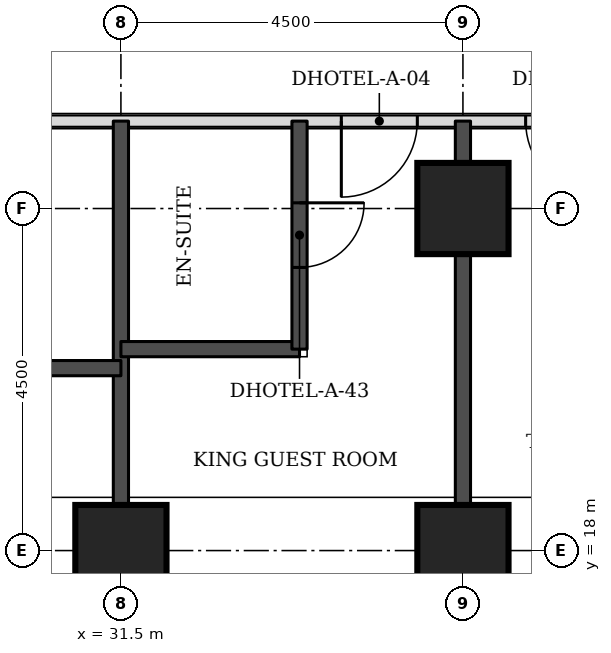
"""IFC4 building model, lengths in metres.
Left out: names, types, materials, properties, quantities, classifications, styles, units other than length and angle.
Written with IfcOpenShell. Run it as: python <this file> out.ifc"""

import sys

from ifc_helpers import new_model, si_unit, direction, frame, frame_2d, origin, origin_2d, place, context, subcontext, project, spatial, rectangle, extrude, element, fill, save


model = new_model("IFC4")
c1 = context("Model", 3, precision=1e-05, world=origin(), true_north=direction((0.0, 1.0)))
c2 = subcontext(c1, "Body", "Model", "MODEL_VIEW")
j1 = project(units=[si_unit("LENGTHUNIT", "METRE"), si_unit("PLANEANGLEUNIT", "RADIAN")], contexts=[c1])
p1 = place(None, origin())
s1 = spatial("IfcSite", under=j1, at=p1, CompositionType="ELEMENT")
p2 = place(p1, origin())
s2 = spatial("IfcBuilding", under=s1, at=p2, CompositionType="ELEMENT")
p3 = place(p2, frame((0.0, 0.0, 49.5)))
s3 = spatial("IfcBuildingStorey", under=s2, at=p3, CompositionType="ELEMENT", Elevation=49.5)
for number, where, z_axis, x_axis in (
    (1, (31.5, 18.0, 0.0), (0.0, 0.0, 1.0), (1.0, 0.0, 0.0)),
    (2, (36.0, 18.0, 0.0), (0.0, 0.0, 1.0), (1.0, 0.0, 0.0)),
    (3, (36.0, 22.5, 0.0), (0.0, 0.0, 1.0), (1.0, 0.0, 0.0)),
):
    element("IfcColumn", number, at=place(p3, frame(where, z_axis=z_axis, x_axis=x_axis)), inside=s3, PredefinedType="COLUMN", context=c2, shape_type="SweptSolid", body=[
        extrude(rectangle(XDim=1.2, YDim=1.2, at=origin_2d()), origin(), (0.0, 0.0, 1.0), 3.3),
    ])
p4 = place(p3, frame((19.15, 23.65, 0.0), z_axis=(0.0, 0.0, 1.0), x_axis=(1.0, 0.0, 0.0)))
e4 = element("IfcWall", 4, at=p4, inside=s3, PredefinedType="PARTITIONING", context=c2, shape_type="SweptSolid", body=[
    extrude(rectangle(XDim=32.35, YDim=0.15, at=frame_2d((16.175, 0.0))), origin(), (0.0, 0.0, 1.0), 3.08),
])
p5 = place(p4, frame((6.275, 0.0, 0.0)))
e5 = element("IfcOpeningElement", 5, at=p5, cuts=e4, PredefinedType="OPENING", context=c2, shape_type="SweptSolid", body=[
    extrude(rectangle(XDim=1.0, YDim=2.1, at=frame_2d((0.5, 1.05))), frame((0.0, 0.085, 0.0), z_axis=(0.0, -1.0, 0.0), x_axis=(1.0, 0.0, 0.0)), (0.0, 0.0, 1.0), 0.17),
])
p6 = place(p4, frame((8.675, 0.0, 0.0)))
e6 = element("IfcOpeningElement", 6, at=p6, cuts=e4, PredefinedType="OPENING", context=c2, shape_type="SweptSolid", body=[
    extrude(rectangle(XDim=1.0, YDim=2.1, at=frame_2d((0.5, 1.05))), frame((0.0, 0.085, 0.0), z_axis=(0.0, -1.0, 0.0), x_axis=(1.0, 0.0, 0.0)), (0.0, 0.0, 1.0), 0.17),
])
p7 = place(p4, frame((15.25, 0.0, 0.0)))
e7 = element("IfcOpeningElement", 7, at=p7, cuts=e4, PredefinedType="OPENING", context=c2, shape_type="SweptSolid", body=[
    extrude(rectangle(XDim=1.0, YDim=2.1, at=frame_2d((0.5, 1.05))), frame((0.0, 0.085, 0.0), z_axis=(0.0, -1.0, 0.0), x_axis=(1.0, 0.0, 0.0)), (0.0, 0.0, 1.0), 0.17),
])
p8 = place(p4, frame((17.675, 0.0, 0.0)))
e8 = element("IfcOpeningElement", 8, at=p8, cuts=e4, PredefinedType="OPENING", context=c2, shape_type="SweptSolid", body=[
    extrude(rectangle(XDim=1.0, YDim=2.1, at=frame_2d((0.5, 1.05))), frame((0.0, 0.085, 0.0), z_axis=(0.0, -1.0, 0.0), x_axis=(1.0, 0.0, 0.0)), (0.0, 0.0, 1.0), 0.17),
])
p9 = place(p4, frame((24.275, 0.0, 0.0)))
e9 = element("IfcOpeningElement", 9, at=p9, cuts=e4, PredefinedType="OPENING", context=c2, shape_type="SweptSolid", body=[
    extrude(rectangle(XDim=1.0, YDim=2.1, at=frame_2d((0.5, 1.05))), frame((0.0, 0.085, 0.0), z_axis=(0.0, -1.0, 0.0), x_axis=(1.0, 0.0, 0.0)), (0.0, 0.0, 1.0), 0.17),
])
p10 = place(p4, frame((26.675, 0.0, 0.0)))
e10 = element("IfcOpeningElement", 10, at=p10, cuts=e4, PredefinedType="OPENING", context=c2, shape_type="SweptSolid", body=[
    extrude(rectangle(XDim=1.0, YDim=2.1, at=frame_2d((0.5, 1.05))), frame((0.0, 0.085, 0.0), z_axis=(0.0, -1.0, 0.0), x_axis=(1.0, 0.0, 0.0)), (0.0, 0.0, 1.0), 0.17),
])
p11 = place(p4, frame((1.175, 0.0, 0.0)))
e11 = element("IfcOpeningElement", 11, at=p11, cuts=e4, PredefinedType="OPENING", context=c2, shape_type="SweptSolid", body=[
    extrude(rectangle(XDim=1.0, YDim=2.1, at=frame_2d((0.5, 1.05))), frame((0.0, 0.085, 0.0), z_axis=(0.0, -1.0, 0.0), x_axis=(1.0, 0.0, 0.0)), (0.0, 0.0, 1.0), 0.17),
])
p12 = place(p4, frame((30.85, 0.0, 0.0)))
e12 = element("IfcOpeningElement", 12, at=p12, cuts=e4, PredefinedType="OPENING", context=c2, shape_type="SweptSolid", body=[
    extrude(rectangle(XDim=1.0, YDim=2.1, at=frame_2d((0.5, 1.05))), frame((0.0, 0.085, 0.0), z_axis=(0.0, -1.0, 0.0), x_axis=(1.0, 0.0, 0.0)), (0.0, 0.0, 1.0), 0.17),
])
for number, where, z_axis, x_axis in (
    (13, (31.5, 18.6, 0.0), (0.0, 0.0, 1.0), (0.0, 1.0, 0.0)),
    (14, (36.0, 18.6, 0.0), (0.0, 0.0, 1.0), (0.0, 1.0, 0.0)),
):
    element("IfcWall", number, at=place(p3, frame(where, z_axis=z_axis, x_axis=x_axis)), inside=s3, PredefinedType="SOLIDWALL", context=c2, shape_type="SweptSolid", body=[
        extrude(rectangle(XDim=5.05, YDim=0.2, at=frame_2d((2.525, 0.0))), origin(), (0.0, 0.0, 1.0), 3.08),
    ])
p13 = place(p3, frame((29.65, 20.4, 0.0), z_axis=(0.0, 0.0, 1.0), x_axis=(1.0, 0.0, 0.0)))
e15 = element("IfcWall", 15, at=p13, inside=s3, PredefinedType="SOLIDWALL", context=c2, shape_type="SweptSolid", body=[
    extrude(rectangle(XDim=1.85, YDim=0.2, at=frame_2d((0.925, 0.0))), origin(), (0.0, 0.0, 1.0), 3.08),
])
p14 = place(p3, frame((31.5, 20.65, 0.0), z_axis=(0.0, 0.0, 1.0), x_axis=(1.0, 0.0, 0.0)))
e16 = element("IfcWall", 16, at=p14, inside=s3, PredefinedType="SOLIDWALL", context=c2, shape_type="SweptSolid", body=[
    extrude(rectangle(XDim=2.35, YDim=0.2, at=frame_2d((1.175, 0.0))), origin(), (0.0, 0.0, 1.0), 3.08),
])
p15 = place(p3, frame((33.85, 20.65, 0.0), z_axis=(0.0, 0.0, 1.0), x_axis=(0.0, 1.0, 0.0)))
e17 = element("IfcWall", 17, at=p15, inside=s3, PredefinedType="SOLIDWALL", context=c2, shape_type="SweptSolid", body=[
    extrude(rectangle(XDim=3.0, YDim=0.2, at=frame_2d((1.5, 0.0))), origin(), (0.0, 0.0, 1.0), 3.08),
])
p16 = place(p15, frame((1.075, 0.0, 0.0)))
e18 = element("IfcOpeningElement", 18, at=p16, cuts=e17, PredefinedType="OPENING", context=c2, shape_type="SweptSolid", body=[
    extrude(rectangle(XDim=0.85, YDim=2.1, at=frame_2d((0.425, 1.05))), frame((0.0, 0.11, 0.0), z_axis=(0.0, -1.0, 0.0), x_axis=(1.0, 0.0, 0.0)), (0.0, 0.0, 1.0), 0.22),
])
p17 = place(p7, frame((1.0, 0.0, 0.0), z_axis=(0.0, 0.0, 1.0), x_axis=(-1.0, 0.0, 0.0)))
e19 = element("IfcDoor", 19, at=p17, inside=s3, OperationType="SINGLE_SWING_RIGHT", PredefinedType="DOOR", context=c2, shape_type="SweptSolid", body=[
    extrude(rectangle(XDim=1.0, YDim=2.1, at=frame_2d((0.5, 1.05))), frame((0.0, 0.025, 0.0), z_axis=(0.0, -1.0, 0.0), x_axis=(1.0, 0.0, 0.0)), (0.0, 0.0, 1.0), 0.05),
])
fill(e7, e19)
p18 = place(p16, frame((0.85, 0.0, 0.0), z_axis=(0.0, 0.0, 1.0), x_axis=(-1.0, 0.0, 0.0)))
e20 = element("IfcDoor", 20, at=p18, inside=s3, OperationType="SINGLE_SWING_LEFT", PredefinedType="DOOR", context=c2, shape_type="SweptSolid", body=[
    extrude(rectangle(XDim=0.85, YDim=2.1, at=frame_2d((0.425, 1.05))), frame((0.0, 0.025, 0.0), z_axis=(0.0, -1.0, 0.0), x_axis=(1.0, 0.0, 0.0)), (0.0, 0.0, 1.0), 0.05),
])
fill(e18, e20)
p19 = place(p8, frame((1.0, 0.0, 0.0), z_axis=(0.0, 0.0, 1.0), x_axis=(-1.0, 0.0, 0.0)))
e21 = element("IfcDoor", 21, at=p19, inside=s3, OperationType="SINGLE_SWING_LEFT", PredefinedType="DOOR", context=c2, shape_type="SweptSolid", body=[
    extrude(rectangle(XDim=1.0, YDim=2.1, at=frame_2d((0.5, 1.05))), frame((0.0, 0.025, 0.0), z_axis=(0.0, -1.0, 0.0), x_axis=(1.0, 0.0, 0.0)), (0.0, 0.0, 1.0), 0.05),
])
fill(e8, e21)
save(model, sys.argv[1])
